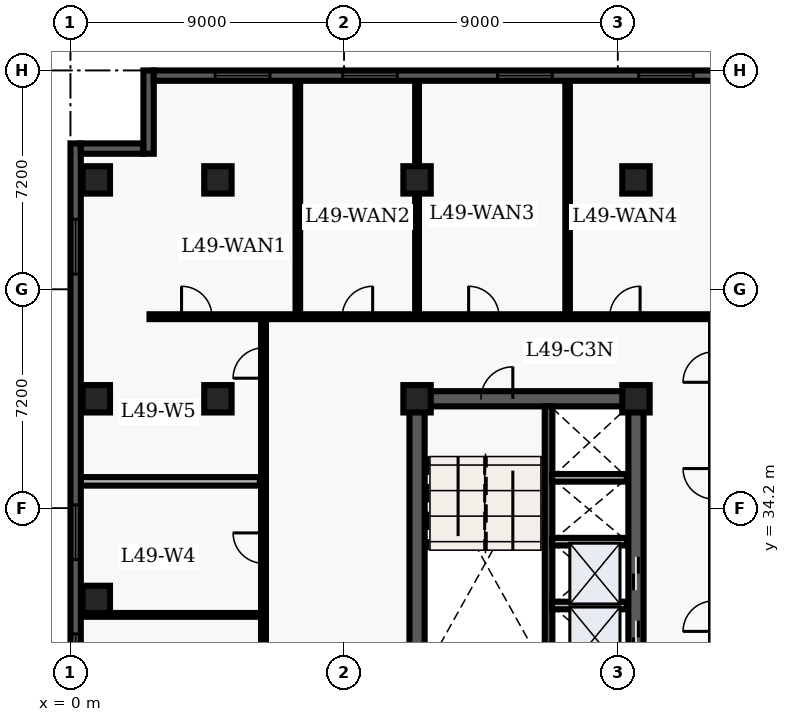
"""IFC4 building model, lengths in metres.
Left out: names, types, materials, properties, quantities, classifications, styles, units other than length and angle.
Written with IfcOpenShell. Run it as: python <this file> out.ifc"""

import sys

from ifc_helpers import new_model, entity, si_unit, converted_unit, direction, frame, origin_with_axes, origin_2d_with_axis, place, context, subcontext, project, spatial, polyline, rectangle, outline, extrude, element, fill, save


model = new_model("IFC4")
c1 = context("Model", 3, precision=1e-05, world=origin_with_axes(), true_north=direction((0.0, 1.0)))
c2 = subcontext(c1, "Body", "Model", "MODEL_VIEW")
j1 = project(units=[si_unit("LENGTHUNIT", "METRE"), converted_unit("PLANEANGLEUNIT", "DEGREE", entity("IfcPlaneAngleMeasure", 0.017), si_unit("PLANEANGLEUNIT", "RADIAN"), dimensions=[0, 0, 0, 0, 0, 0, 0])], contexts=[c1])
p1 = place(None, origin_with_axes())
s1 = spatial("IfcSite", under=j1, at=p1, CompositionType="ELEMENT")
p2 = place(p1, origin_with_axes())
s2 = spatial("IfcBuilding", under=s1, at=p2, CompositionType="ELEMENT")
p3 = place(p2, frame((0.0, 0.0, 200.4), z_axis=(0.0, 0.0, 1.0), x_axis=(1.0, 0.0, 0.0)))
s3 = spatial("IfcBuildingStorey", under=s2, at=p3, CompositionType="ELEMENT", Elevation=200.4)
p4 = place(p3, frame((11.4, 10.8, 0.0), z_axis=(0.0, 0.0, 1.0), x_axis=(0.0, 1.0, 0.0)))
e1 = element("IfcWall", 1, at=p4, inside=s3, PredefinedType="SHEAR", context=c2, shape_type="SweptSolid", body=[
    extrude(outline(polyline([(0.0, -0.25), (27.0, -0.25), (27.0, 0.25), (0.0, 0.25), (0.0, -0.25)])), origin_with_axes(), (0.0, 0.0, 1.0), 3.66),
])
p5 = place(p3, frame((11.4, 37.8, 0.0), z_axis=(0.0, 0.0, 1.0), x_axis=(1.0, 0.0, 0.0)))
e2 = element("IfcWall", 2, at=p5, inside=s3, PredefinedType="SHEAR", context=c2, shape_type="SweptSolid", body=[
    extrude(outline(polyline([(0.0, -0.25), (7.2, -0.25), (7.2, 0.25), (0.0, 0.25), (0.0, -0.25)])), origin_with_axes(), (0.0, 0.0, 1.0), 3.66),
])
p6 = place(p5, frame((2.625, 0.0, 0.0), z_axis=(0.0, 0.0, 1.0), x_axis=(1.0, 0.0, 0.0)))
e3 = element("IfcOpeningElement", 3, at=p6, cuts=e2, PredefinedType="OPENING", context=c2, shape_type="SweptSolid", body=[
    extrude(rectangle(XDim=1.05, YDim=0.52, at=origin_2d_with_axis()), origin_with_axes(), (0.0, 0.0, 1.0), 2.15),
])
p7 = place(p3, frame((18.6, 24.3, 0.0), z_axis=(0.0, 0.0, 1.0), x_axis=(0.0, 1.0, 0.0)))
e4 = element("IfcWall", 4, at=p7, inside=s3, PredefinedType="SHEAR", context=c2, shape_type="SweptSolid", body=[
    extrude(outline(polyline([(0.0, -0.25), (13.5, -0.25), (13.5, 0.25), (0.0, 0.25), (0.0, -0.25)])), origin_with_axes(), (0.0, 0.0, 1.0), 3.66),
])
p8 = place(p7, frame((5.65, 0.0, 0.0), z_axis=(0.0, 0.0, 1.0), x_axis=(1.0, 0.0, 0.0)))
e5 = element("IfcOpeningElement", 5, at=p8, cuts=e4, PredefinedType="OPENING", context=c2, shape_type="SweptSolid", body=[
    extrude(rectangle(XDim=1.1, YDim=0.52, at=origin_2d_with_axis()), origin_with_axes(), (0.0, 0.0, 1.0), 2.15),
])
p9 = place(p7, frame((7.75, 0.0, 0.0), z_axis=(0.0, 0.0, 1.0), x_axis=(1.0, 0.0, 0.0)))
e6 = element("IfcOpeningElement", 6, at=p9, cuts=e4, PredefinedType="OPENING", context=c2, shape_type="SweptSolid", body=[
    extrude(rectangle(XDim=1.1, YDim=0.52, at=origin_2d_with_axis()), origin_with_axes(), (0.0, 0.0, 1.0), 2.15),
])
p10 = place(p3, frame((15.725, 28.9, 0.0), z_axis=(0.0, 0.0, 1.0), x_axis=(0.0, 1.0, 0.0)))
e7 = element("IfcWall", 7, at=p10, inside=s3, PredefinedType="SHEAR", context=c2, shape_type="SweptSolid", body=[
    extrude(outline(polyline([(0.0, -0.125), (8.65, -0.125), (8.65, 0.125), (0.0, 0.125), (0.0, -0.125)])), origin_with_axes(), (0.0, 0.0, 1.0), 3.66),
])
for number, where, z_axis, x_axis in (
    (8, (11.4, 37.8, 0.0), (0.0, 0.0, 1.0), (1.0, 0.0, 0.0)),
    (9, (11.4, 45.0, 0.0), (0.0, 0.0, 1.0), (1.0, 0.0, 0.0)),
    (10, (18.6, 37.8, 0.0), (0.0, 0.0, 1.0), (1.0, 0.0, 0.0)),
    (11, (18.6, 45.0, 0.0), (0.0, 0.0, 1.0), (1.0, 0.0, 0.0)),
    (12, (4.85, 37.8, 0.0), (0.0, 0.0, 1.0), (1.0, 0.0, 0.0)),
    (13, (4.85, 45.0, 0.0), (0.0, 0.0, 1.0), (1.0, 0.0, 0.0)),
    (14, (0.85, 31.2, 0.0), (0.0, 0.0, 1.0), (1.0, 0.0, 0.0)),
    (15, (0.85, 37.8, 0.0), (0.0, 0.0, 1.0), (1.0, 0.0, 0.0)),
    (16, (0.85, 45.0, 0.0), (0.0, 0.0, 1.0), (1.0, 0.0, 0.0)),
):
    element("IfcColumn", number, at=place(p3, frame(where, z_axis=z_axis, x_axis=x_axis)), inside=s3, PredefinedType="COLUMN", context=c2, shape_type="SweptSolid", body=[
        extrude(rectangle(XDim=0.9, YDim=0.9, at=origin_2d_with_axis()), origin_with_axes(), (0.0, 0.0, 1.0), 3.9),
    ])
for number, where, z_axis, x_axis in (
    (17, (15.84, 31.0, 0.0), (0.0, 0.0, 1.0), (1.0, 0.0, 0.0)),
    (18, (15.84, 33.1, 0.0), (0.0, 0.0, 1.0), (1.0, 0.0, 0.0)),
    (19, (15.84, 35.2, 0.0), (0.0, 0.0, 1.0), (1.0, 0.0, 0.0)),
):
    element("IfcWall", number, at=place(p3, frame(where, z_axis=z_axis, x_axis=x_axis)), inside=s3, PredefinedType="SOLIDWALL", context=c2, shape_type="SweptSolid", body=[
        extrude(outline(polyline([(0.0, -0.125), (2.46, -0.125), (2.46, 0.125), (0.0, 0.125), (0.0, -0.125)])), origin_with_axes(), (0.0, 0.0, 1.0), 2.7),
    ])
p11 = place(p3, frame((2.6, 40.5, 0.0), z_axis=(0.0, 0.0, 1.0), x_axis=(1.0, 0.0, 0.0)))
e20 = element("IfcWall", 20, at=p11, inside=s3, PredefinedType="PARTITIONING", context=c2, shape_type="SweptSolid", body=[
    extrude(outline(polyline([(0.0, -0.08), (26.177, -0.08), (26.177, 0.08), (0.0, 0.08), (0.0, -0.08)])), origin_with_axes(), (0.0, 0.0, 1.0), 2.7),
])
p12 = place(p11, frame((1.554, 0.0, 0.0), z_axis=(0.0, 0.0, 1.0), x_axis=(1.0, 0.0, 0.0)))
e21 = element("IfcOpeningElement", 21, at=p12, cuts=e20, PredefinedType="OPENING", context=c2, shape_type="SweptSolid", body=[
    extrude(rectangle(XDim=1.0, YDim=0.18, at=origin_2d_with_axis()), origin_with_axes(), (0.0, 0.0, 1.0), 2.15),
])
p13 = place(p11, frame((6.84, 0.0, 0.0), z_axis=(0.0, 0.0, 1.0), x_axis=(1.0, 0.0, 0.0)))
e22 = element("IfcOpeningElement", 22, at=p13, cuts=e20, PredefinedType="OPENING", context=c2, shape_type="SweptSolid", body=[
    extrude(rectangle(XDim=1.0, YDim=0.18, at=origin_2d_with_axis()), origin_with_axes(), (0.0, 0.0, 1.0), 2.15),
])
p14 = place(p11, frame((10.996, 0.0, 0.0), z_axis=(0.0, 0.0, 1.0), x_axis=(1.0, 0.0, 0.0)))
e23 = element("IfcOpeningElement", 23, at=p14, cuts=e20, PredefinedType="OPENING", context=c2, shape_type="SweptSolid", body=[
    extrude(rectangle(XDim=1.0, YDim=0.18, at=origin_2d_with_axis()), origin_with_axes(), (0.0, 0.0, 1.0), 2.15),
])
p15 = place(p11, frame((15.636, 0.0, 0.0), z_axis=(0.0, 0.0, 1.0), x_axis=(1.0, 0.0, 0.0)))
e24 = element("IfcOpeningElement", 24, at=p15, cuts=e20, PredefinedType="OPENING", context=c2, shape_type="SweptSolid", body=[
    extrude(rectangle(XDim=1.0, YDim=0.18, at=origin_2d_with_axis()), origin_with_axes(), (0.0, 0.0, 1.0), 2.15),
])
p16 = place(p3, frame((6.35, 7.8, 0.0), z_axis=(0.0, 0.0, 1.0), x_axis=(0.0, 1.0, 0.0)))
e25 = element("IfcWall", 25, at=p16, inside=s3, PredefinedType="PARTITIONING", context=c2, shape_type="SweptSolid", body=[
    extrude(outline(polyline([(0.0, -0.08), (32.7, -0.08), (32.7, 0.08), (0.0, 0.08), (0.0, -0.08)])), origin_with_axes(), (0.0, 0.0, 1.0), 2.7),
])
p17 = place(p16, frame((4.415, 0.0, 0.0), z_axis=(0.0, 0.0, 1.0), x_axis=(1.0, 0.0, 0.0)))
e26 = element("IfcOpeningElement", 26, at=p17, cuts=e25, PredefinedType="OPENING", context=c2, shape_type="SweptSolid", body=[
    extrude(rectangle(XDim=1.0, YDim=0.18, at=origin_2d_with_axis()), origin_with_axes(), (0.0, 0.0, 1.0), 2.15),
])
p18 = place(p16, frame((9.986, 0.0, 0.0), z_axis=(0.0, 0.0, 1.0), x_axis=(1.0, 0.0, 0.0)))
e27 = element("IfcOpeningElement", 27, at=p18, cuts=e25, PredefinedType="OPENING", context=c2, shape_type="SweptSolid", body=[
    extrude(rectangle(XDim=1.0, YDim=0.18, at=origin_2d_with_axis()), origin_with_axes(), (0.0, 0.0, 1.0), 2.15),
])
p19 = place(p16, frame((18.332, 0.0, 0.0), z_axis=(0.0, 0.0, 1.0), x_axis=(1.0, 0.0, 0.0)))
e28 = element("IfcOpeningElement", 28, at=p19, cuts=e25, PredefinedType="OPENING", context=c2, shape_type="SweptSolid", body=[
    extrude(rectangle(XDim=1.0, YDim=0.18, at=origin_2d_with_axis()), origin_with_axes(), (0.0, 0.0, 1.0), 2.15),
])
p20 = place(p16, frame((25.088, 0.0, 0.0), z_axis=(0.0, 0.0, 1.0), x_axis=(1.0, 0.0, 0.0)))
e29 = element("IfcOpeningElement", 29, at=p20, cuts=e25, PredefinedType="OPENING", context=c2, shape_type="SweptSolid", body=[
    extrude(rectangle(XDim=1.0, YDim=0.18, at=origin_2d_with_axis()), origin_with_axes(), (0.0, 0.0, 1.0), 2.15),
])
p21 = place(p16, frame((31.177, 0.0, 0.0), z_axis=(0.0, 0.0, 1.0), x_axis=(1.0, 0.0, 0.0)))
e30 = element("IfcOpeningElement", 30, at=p21, cuts=e25, PredefinedType="OPENING", context=c2, shape_type="SweptSolid", body=[
    extrude(rectangle(XDim=1.0, YDim=0.18, at=origin_2d_with_axis()), origin_with_axes(), (0.0, 0.0, 1.0), 2.15),
])
p22 = place(p3, frame((0.335, 30.692, 0.0), z_axis=(0.0, 0.0, 1.0), x_axis=(1.0, 0.0, 0.0)))
e31 = element("IfcWall", 31, at=p22, inside=s3, PredefinedType="PARTITIONING", context=c2, shape_type="SweptSolid", body=[
    extrude(outline(polyline([(0.0, -0.062), (5.895, -0.062), (5.895, 0.062), (0.0, 0.062), (0.0, -0.062)])), origin_with_axes(), (0.0, 0.0, 1.0), 2.7),
])
p23 = place(p3, frame((0.335, 35.084, 0.0), z_axis=(0.0, 0.0, 1.0), x_axis=(1.0, 0.0, 0.0)))
e32 = element("IfcWall", 32, at=p23, inside=s3, PredefinedType="PARTITIONING", context=c2, shape_type="SweptSolid", body=[
    extrude(outline(polyline([(0.0, -0.14), (5.895, -0.14), (5.895, 0.14), (0.0, 0.14), (0.0, -0.14)])), origin_with_axes(), (0.0, 0.0, 1.0), 2.7),
])
p24 = place(p3, frame((7.479, 40.6, 0.0), z_axis=(0.0, 0.0, 1.0), x_axis=(0.0, 1.0, 0.0)))
e33 = element("IfcWall", 33, at=p24, inside=s3, PredefinedType="PARTITIONING", context=c2, shape_type="SweptSolid", body=[
    extrude(outline(polyline([(0.0, -0.075), (7.665, -0.075), (7.665, 0.075), (0.0, 0.075), (0.0, -0.075)])), origin_with_axes(), (0.0, 0.0, 1.0), 2.7),
])
p25 = place(p3, frame((11.4, 40.6, 0.0), z_axis=(0.0, 0.0, 1.0), x_axis=(0.0, 1.0, 0.0)))
e34 = element("IfcWall", 34, at=p25, inside=s3, PredefinedType="PARTITIONING", context=c2, shape_type="SweptSolid", body=[
    extrude(outline(polyline([(0.0, -0.062), (7.665, -0.062), (7.665, 0.062), (0.0, 0.062), (0.0, -0.062)])), origin_with_axes(), (0.0, 0.0, 1.0), 2.7),
])
p26 = place(p3, frame((16.352, 40.6, 0.0), z_axis=(0.0, 0.0, 1.0), x_axis=(0.0, 1.0, 0.0)))
e35 = element("IfcWall", 35, at=p26, inside=s3, PredefinedType="PARTITIONING", context=c2, shape_type="SweptSolid", body=[
    extrude(outline(polyline([(0.0, -0.075), (7.665, -0.075), (7.665, 0.075), (0.0, 0.075), (0.0, -0.075)])), origin_with_axes(), (0.0, 0.0, 1.0), 2.7),
])
p27 = place(p3, frame((0.17, 2.74, 0.0), z_axis=(0.0, 0.0, 1.0), x_axis=(0.0, 1.0, 0.0)))
e36 = element("IfcWall", 36, at=p27, inside=s3, PredefinedType="SOLIDWALL", context=c2, shape_type="SweptSolid", body=[
    extrude(outline(polyline([(0.0, -0.17), (43.46, -0.17), (43.46, 0.17), (0.0, 0.17), (0.0, -0.17)])), origin_with_axes(), (0.0, 0.0, 1.0), 3.66),
])
p28 = place(p27, frame((2.948, 0.0, 0.45), z_axis=(0.0, 0.0, 1.0), x_axis=(1.0, 0.0, 0.0)))
e37 = element("IfcOpeningElement", 37, at=p28, cuts=e36, PredefinedType="OPENING", context=c2, shape_type="SweptSolid", body=[
    extrude(rectangle(XDim=1.8, YDim=0.36, at=origin_2d_with_axis()), origin_with_axes(), (0.0, 0.0, 1.0), 2.1),
])
p29 = place(p27, frame((12.789, 0.0, 0.45), z_axis=(0.0, 0.0, 1.0), x_axis=(1.0, 0.0, 0.0)))
e38 = element("IfcOpeningElement", 38, at=p29, cuts=e36, PredefinedType="OPENING", context=c2, shape_type="SweptSolid", body=[
    extrude(rectangle(XDim=1.8, YDim=0.36, at=origin_2d_with_axis()), origin_with_axes(), (0.0, 0.0, 1.0), 2.1),
])
p30 = place(p27, frame((21.73, 0.0, 0.45), z_axis=(0.0, 0.0, 1.0), x_axis=(1.0, 0.0, 0.0)))
e39 = element("IfcOpeningElement", 39, at=p30, cuts=e36, PredefinedType="OPENING", context=c2, shape_type="SweptSolid", body=[
    extrude(rectangle(XDim=1.8, YDim=0.36, at=origin_2d_with_axis()), origin_with_axes(), (0.0, 0.0, 1.0), 2.1),
])
p31 = place(p27, frame((26.426, 0.0, 0.45), z_axis=(0.0, 0.0, 1.0), x_axis=(1.0, 0.0, 0.0)))
e40 = element("IfcOpeningElement", 40, at=p31, cuts=e36, PredefinedType="OPENING", context=c2, shape_type="SweptSolid", body=[
    extrude(rectangle(XDim=1.8, YDim=0.36, at=origin_2d_with_axis()), origin_with_axes(), (0.0, 0.0, 1.0), 2.1),
])
p32 = place(p27, frame((30.671, 0.0, 0.45), z_axis=(0.0, 0.0, 1.0), x_axis=(1.0, 0.0, 0.0)))
e41 = element("IfcOpeningElement", 41, at=p32, cuts=e36, PredefinedType="OPENING", context=c2, shape_type="SweptSolid", body=[
    extrude(rectangle(XDim=1.8, YDim=0.36, at=origin_2d_with_axis()), origin_with_axes(), (0.0, 0.0, 1.0), 2.1),
])
p33 = place(p27, frame((40.062, 0.0, 0.45), z_axis=(0.0, 0.0, 1.0), x_axis=(1.0, 0.0, 0.0)))
e42 = element("IfcOpeningElement", 42, at=p33, cuts=e36, PredefinedType="OPENING", context=c2, shape_type="SweptSolid", body=[
    extrude(rectangle(XDim=1.8, YDim=0.36, at=origin_2d_with_axis()), origin_with_axes(), (0.0, 0.0, 1.0), 2.1),
])
p34 = place(p3, frame((0.34, 46.03, 0.0), z_axis=(0.0, 0.0, 1.0), x_axis=(1.0, 0.0, 0.0)))
e43 = element("IfcWall", 43, at=p34, inside=s3, PredefinedType="SOLIDWALL", context=c2, shape_type="SweptSolid", body=[
    extrude(outline(polyline([(0.0, -0.17), (2.06, -0.17), (2.06, 0.17), (0.0, 0.17), (0.0, -0.17)])), origin_with_axes(), (0.0, 0.0, 1.0), 3.66),
])
p35 = place(p3, frame((2.57, 45.86, 0.0), z_axis=(0.0, 0.0, 1.0), x_axis=(0.0, 1.0, 0.0)))
e44 = element("IfcWall", 44, at=p35, inside=s3, PredefinedType="SOLIDWALL", context=c2, shape_type="SweptSolid", body=[
    extrude(outline(polyline([(0.0, -0.17), (2.74, -0.17), (2.74, 0.17), (0.0, 0.17), (0.0, -0.17)])), origin_with_axes(), (0.0, 0.0, 1.0), 3.66),
])
p36 = place(p3, frame((2.74, 48.43, 0.0), z_axis=(0.0, 0.0, 1.0), x_axis=(1.0, 0.0, 0.0)))
e45 = element("IfcWall", 45, at=p36, inside=s3, PredefinedType="SOLIDWALL", context=c2, shape_type="SweptSolid", body=[
    extrude(outline(polyline([(0.0, -0.17), (19.772, -0.17), (19.772, 0.17), (0.0, 0.17), (0.0, -0.17)])), origin_with_axes(), (0.0, 0.0, 1.0), 3.66),
])
p37 = place(p36, frame((2.922, 0.0, 0.45), z_axis=(0.0, 0.0, 1.0), x_axis=(1.0, 0.0, 0.0)))
e46 = element("IfcOpeningElement", 46, at=p37, cuts=e45, PredefinedType="OPENING", context=c2, shape_type="SweptSolid", body=[
    extrude(rectangle(XDim=1.8, YDim=0.36, at=origin_2d_with_axis()), origin_with_axes(), (0.0, 0.0, 1.0), 2.1),
])
p38 = place(p36, frame((7.114, 0.0, 0.45), z_axis=(0.0, 0.0, 1.0), x_axis=(1.0, 0.0, 0.0)))
e47 = element("IfcOpeningElement", 47, at=p38, cuts=e45, PredefinedType="OPENING", context=c2, shape_type="SweptSolid", body=[
    extrude(rectangle(XDim=1.8, YDim=0.36, at=origin_2d_with_axis()), origin_with_axes(), (0.0, 0.0, 1.0), 2.1),
])
p39 = place(p36, frame((12.207, 0.0, 0.45), z_axis=(0.0, 0.0, 1.0), x_axis=(1.0, 0.0, 0.0)))
e48 = element("IfcOpeningElement", 48, at=p39, cuts=e45, PredefinedType="OPENING", context=c2, shape_type="SweptSolid", body=[
    extrude(rectangle(XDim=1.8, YDim=0.36, at=origin_2d_with_axis()), origin_with_axes(), (0.0, 0.0, 1.0), 2.1),
])
p40 = place(p36, frame((16.85, 0.0, 0.45), z_axis=(0.0, 0.0, 1.0), x_axis=(1.0, 0.0, 0.0)))
e49 = element("IfcOpeningElement", 49, at=p40, cuts=e45, PredefinedType="OPENING", context=c2, shape_type="SweptSolid", body=[
    extrude(rectangle(XDim=1.8, YDim=0.36, at=origin_2d_with_axis()), origin_with_axes(), (0.0, 0.0, 1.0), 2.1),
])
p41 = place(p7, frame((5.65, 0.0, 0.0), z_axis=(0.0, 0.0, 1.0), x_axis=(1.0, 0.0, 0.0)))
e50 = element("IfcDoor", 50, at=p41, inside=s3, OperationType="SLIDING_TO_LEFT", PredefinedType="DOOR", context=c2, shape_type="SweptSolid", body=[
    extrude(rectangle(XDim=1.1, YDim=0.09, at=origin_2d_with_axis()), origin_with_axes(), (0.0, 0.0, 1.0), 2.15),
])
fill(e5, e50)
p42 = place(p7, frame((7.75, 0.0, 0.0), z_axis=(0.0, 0.0, 1.0), x_axis=(1.0, 0.0, 0.0)))
e51 = element("IfcDoor", 51, at=p42, inside=s3, OperationType="SLIDING_TO_RIGHT", PredefinedType="DOOR", context=c2, shape_type="SweptSolid", body=[
    extrude(rectangle(XDim=1.1, YDim=0.09, at=origin_2d_with_axis()), origin_with_axes(), (0.0, 0.0, 1.0), 2.15),
])
fill(e6, e51)
p43 = place(p5, frame((2.625, 0.0, 0.0), z_axis=(0.0, 0.0, 1.0), x_axis=(1.0, 0.0, 0.0)))
e52 = element("IfcDoor", 52, at=p43, inside=s3, OperationType="SINGLE_SWING_RIGHT", PredefinedType="DOOR", context=c2, shape_type="SweptSolid", body=[
    extrude(rectangle(XDim=1.05, YDim=0.09, at=origin_2d_with_axis()), origin_with_axes(), (0.0, 0.0, 1.0), 2.15),
])
fill(e3, e52)
p44 = place(p16, frame((25.088, 0.0, 0.0), z_axis=(0.0, 0.0, 1.0), x_axis=(1.0, 0.0, 0.0)))
e53 = element("IfcDoor", 53, at=p44, inside=s3, OperationType="SINGLE_SWING_RIGHT", PredefinedType="DOOR", context=c2, shape_type="SweptSolid", body=[
    extrude(rectangle(XDim=1.0, YDim=0.09, at=origin_2d_with_axis()), origin_with_axes(), (0.0, 0.0, 1.0), 2.15),
])
fill(e29, e53)
p45 = place(p16, frame((31.177, 0.0, 0.0), z_axis=(0.0, 0.0, 1.0), x_axis=(1.0, 0.0, 0.0)))
e54 = element("IfcDoor", 54, at=p45, inside=s3, OperationType="SINGLE_SWING_LEFT", PredefinedType="DOOR", context=c2, shape_type="SweptSolid", body=[
    extrude(rectangle(XDim=1.0, YDim=0.09, at=origin_2d_with_axis()), origin_with_axes(), (0.0, 0.0, 1.0), 2.15),
])
fill(e30, e54)
p46 = place(p11, frame((1.554, 0.0, 0.0), z_axis=(0.0, 0.0, 1.0), x_axis=(1.0, 0.0, 0.0)))
e55 = element("IfcDoor", 55, at=p46, inside=s3, OperationType="SINGLE_SWING_LEFT", PredefinedType="DOOR", context=c2, shape_type="SweptSolid", body=[
    extrude(rectangle(XDim=1.0, YDim=0.09, at=origin_2d_with_axis()), origin_with_axes(), (0.0, 0.0, 1.0), 2.15),
])
fill(e21, e55)
p47 = place(p11, frame((6.84, 0.0, 0.0), z_axis=(0.0, 0.0, 1.0), x_axis=(1.0, 0.0, 0.0)))
e56 = element("IfcDoor", 56, at=p47, inside=s3, OperationType="SINGLE_SWING_RIGHT", PredefinedType="DOOR", context=c2, shape_type="SweptSolid", body=[
    extrude(rectangle(XDim=1.0, YDim=0.09, at=origin_2d_with_axis()), origin_with_axes(), (0.0, 0.0, 1.0), 2.15),
])
fill(e22, e56)
p48 = place(p11, frame((10.996, 0.0, 0.0), z_axis=(0.0, 0.0, 1.0), x_axis=(1.0, 0.0, 0.0)))
e57 = element("IfcDoor", 57, at=p48, inside=s3, OperationType="SINGLE_SWING_LEFT", PredefinedType="DOOR", context=c2, shape_type="SweptSolid", body=[
    extrude(rectangle(XDim=1.0, YDim=0.09, at=origin_2d_with_axis()), origin_with_axes(), (0.0, 0.0, 1.0), 2.15),
])
fill(e23, e57)
p49 = place(p11, frame((15.636, 0.0, 0.0), z_axis=(0.0, 0.0, 1.0), x_axis=(1.0, 0.0, 0.0)))
e58 = element("IfcDoor", 58, at=p49, inside=s3, OperationType="SINGLE_SWING_RIGHT", PredefinedType="DOOR", context=c2, shape_type="SweptSolid", body=[
    extrude(rectangle(XDim=1.0, YDim=0.09, at=origin_2d_with_axis()), origin_with_axes(), (0.0, 0.0, 1.0), 2.15),
])
fill(e24, e58)
p50 = place(p27, frame((26.426, 0.0, 0.45), z_axis=(0.0, 0.0, 1.0), x_axis=(1.0, 0.0, 0.0)))
e59 = element("IfcWindow", 59, at=p50, inside=s3, PredefinedType="WINDOW", context=c2, shape_type="SweptSolid", body=[
    extrude(rectangle(XDim=1.8, YDim=0.09, at=origin_2d_with_axis()), origin_with_axes(), (0.0, 0.0, 1.0), 2.1),
])
fill(e40, e59)
p51 = place(p27, frame((30.671, 0.0, 0.45), z_axis=(0.0, 0.0, 1.0), x_axis=(1.0, 0.0, 0.0)))
e60 = element("IfcWindow", 60, at=p51, inside=s3, PredefinedType="WINDOW", context=c2, shape_type="SweptSolid", body=[
    extrude(rectangle(XDim=1.8, YDim=0.09, at=origin_2d_with_axis()), origin_with_axes(), (0.0, 0.0, 1.0), 2.1),
])
fill(e41, e60)
p52 = place(p27, frame((40.062, 0.0, 0.45), z_axis=(0.0, 0.0, 1.0), x_axis=(1.0, 0.0, 0.0)))
e61 = element("IfcWindow", 61, at=p52, inside=s3, PredefinedType="WINDOW", context=c2, shape_type="SweptSolid", body=[
    extrude(rectangle(XDim=1.8, YDim=0.09, at=origin_2d_with_axis()), origin_with_axes(), (0.0, 0.0, 1.0), 2.1),
])
fill(e42, e61)
p53 = place(p36, frame((2.922, 0.0, 0.45), z_axis=(0.0, 0.0, 1.0), x_axis=(1.0, 0.0, 0.0)))
e62 = element("IfcWindow", 62, at=p53, inside=s3, PredefinedType="WINDOW", context=c2, shape_type="SweptSolid", body=[
    extrude(rectangle(XDim=1.8, YDim=0.09, at=origin_2d_with_axis()), origin_with_axes(), (0.0, 0.0, 1.0), 2.1),
])
fill(e46, e62)
p54 = place(p36, frame((7.114, 0.0, 0.45), z_axis=(0.0, 0.0, 1.0), x_axis=(1.0, 0.0, 0.0)))
e63 = element("IfcWindow", 63, at=p54, inside=s3, PredefinedType="WINDOW", context=c2, shape_type="SweptSolid", body=[
    extrude(rectangle(XDim=1.8, YDim=0.09, at=origin_2d_with_axis()), origin_with_axes(), (0.0, 0.0, 1.0), 2.1),
])
fill(e47, e63)
p55 = place(p36, frame((12.207, 0.0, 0.45), z_axis=(0.0, 0.0, 1.0), x_axis=(1.0, 0.0, 0.0)))
e64 = element("IfcWindow", 64, at=p55, inside=s3, PredefinedType="WINDOW", context=c2, shape_type="SweptSolid", body=[
    extrude(rectangle(XDim=1.8, YDim=0.09, at=origin_2d_with_axis()), origin_with_axes(), (0.0, 0.0, 1.0), 2.1),
])
fill(e48, e64)
p56 = place(p36, frame((16.85, 0.0, 0.45), z_axis=(0.0, 0.0, 1.0), x_axis=(1.0, 0.0, 0.0)))
e65 = element("IfcWindow", 65, at=p56, inside=s3, PredefinedType="WINDOW", context=c2, shape_type="SweptSolid", body=[
    extrude(rectangle(XDim=1.8, YDim=0.09, at=origin_2d_with_axis()), origin_with_axes(), (0.0, 0.0, 1.0), 2.1),
])
fill(e49, e65)
save(model, sys.argv[1])
